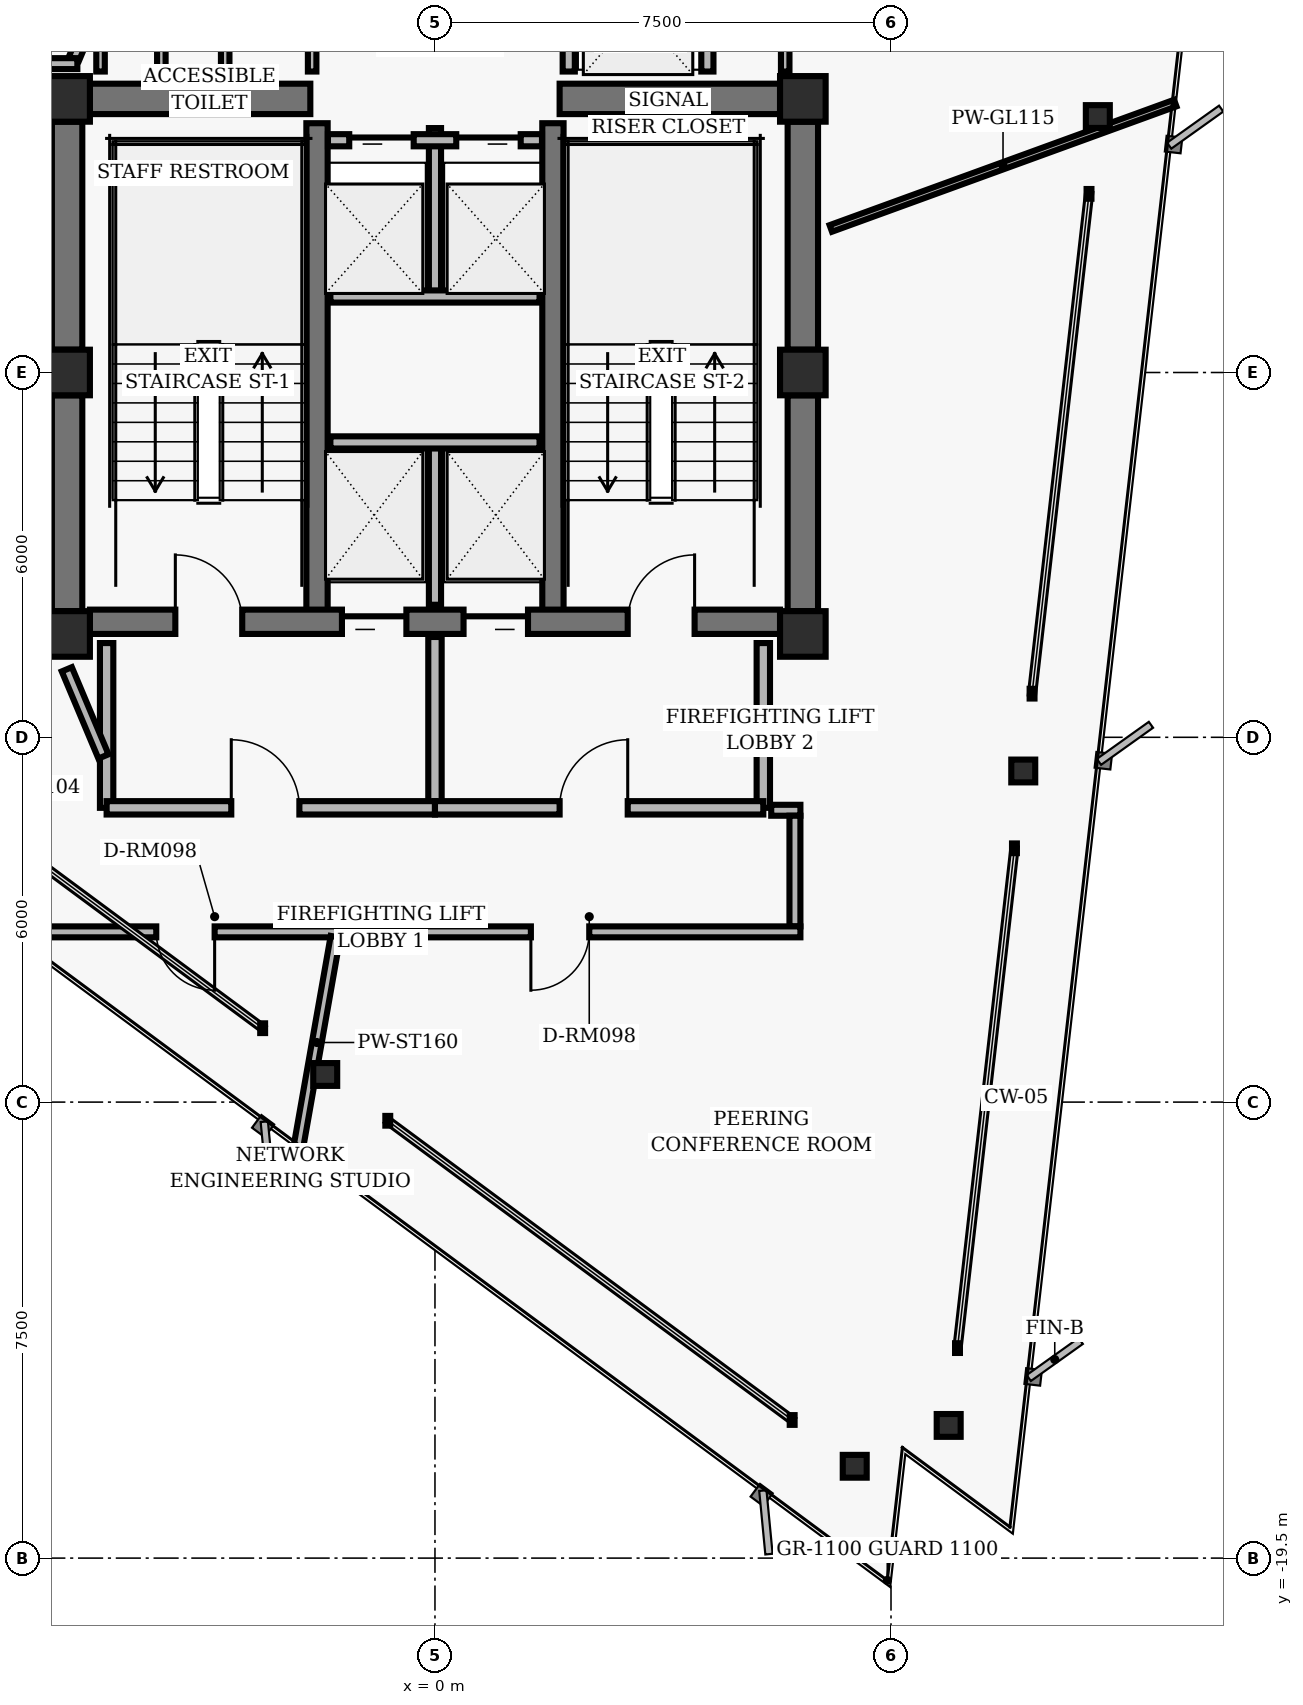
"""IFC4 building model, lengths in metres.
Left out: names, types, materials, properties, quantities, classifications, styles, units other than length and angle.
Written with IfcOpenShell. Run it as: python <this file> out.ifc"""

import sys

from ifc_helpers import new_model, si_unit, direction, frame, frame_2d, origin, origin_2d, place, context, subcontext, project, spatial, rectangle, hollow_rectangle, i_section, extrude, element, fill, save


model = new_model("IFC4")
c1 = context("Model", 3, precision=1e-05, world=origin(), true_north=direction((0.0, 1.0)))
c2 = subcontext(c1, "Body", "Model", "MODEL_VIEW")
j1 = project(units=[si_unit("LENGTHUNIT", "METRE"), si_unit("PLANEANGLEUNIT", "RADIAN")], contexts=[c1])
p1 = place(None, origin())
s1 = spatial("IfcSite", under=j1, at=p1, CompositionType="ELEMENT")
p2 = place(p1, origin())
s2 = spatial("IfcBuilding", under=s1, at=p2, CompositionType="ELEMENT")
p3 = place(p2, frame((0.0, 0.0, 220.96)))
s3 = spatial("IfcBuildingStorey", under=s2, at=p3, CompositionType="ELEMENT", Elevation=220.96)
for number, where, z_axis, x_axis in (
    (1, (-6.05, 4.5, 0.0), (0.0, 0.0, 1.0), (1.0, 0.0, 0.0)),
    (2, (6.05, 4.5, 0.0), (0.0, 0.0, 1.0), (1.0, 0.0, 0.0)),
    (3, (-6.05, 0.0, 0.0), (0.0, 0.0, 1.0), (1.0, 0.0, 0.0)),
    (4, (6.05, 0.0, 0.0), (0.0, 0.0, 1.0), (1.0, 0.0, 0.0)),
    (5, (-6.05, -4.3, 0.0), (0.0, 0.0, 1.0), (1.0, 0.0, 0.0)),
    (6, (6.05, -4.3, 0.0), (0.0, 0.0, 1.0), (1.0, 0.0, 0.0)),
):
    element("IfcColumn", number, at=place(p3, frame(where, z_axis=z_axis, x_axis=x_axis)), inside=s3, PredefinedType="COLUMN", context=c2, shape_type="SweptSolid", body=[
        extrude(hollow_rectangle(XDim=0.75, YDim=0.75, WallThickness=0.05, InnerFilletRadius=0.02, OuterFilletRadius=0.04, at=origin_2d()), origin(), (0.0, 0.0, 1.0), 3.04),
    ])
p4 = place(p3, frame((-6.05, 0.375, 0.0), z_axis=(0.0, 0.0, 1.0), x_axis=(0.0, 1.0, 0.0)))
e7 = element("IfcWall", 7, at=p4, inside=s3, PredefinedType="SHEAR", context=c2, shape_type="SweptSolid", body=[
    extrude(rectangle(XDim=3.75, YDim=0.5, at=frame_2d((1.875, 0.0))), origin(), (0.0, 0.0, 1.0), 2.798),
])
p5 = place(p3, frame((-6.05, -3.925, 0.0), z_axis=(0.0, 0.0, 1.0), x_axis=(0.0, 1.0, 0.0)))
e8 = element("IfcWall", 8, at=p5, inside=s3, PredefinedType="SHEAR", context=c2, shape_type="SweptSolid", body=[
    extrude(rectangle(XDim=3.55, YDim=0.5, at=frame_2d((1.775, 0.0))), origin(), (0.0, 0.0, 1.0), 2.798),
])
p6 = place(p3, frame((6.05, 0.375, 0.0), z_axis=(0.0, 0.0, 1.0), x_axis=(0.0, 1.0, 0.0)))
e9 = element("IfcWall", 9, at=p6, inside=s3, PredefinedType="SHEAR", context=c2, shape_type="SweptSolid", body=[
    extrude(rectangle(XDim=3.75, YDim=0.5, at=frame_2d((1.875, 0.0))), origin(), (0.0, 0.0, 1.0), 2.798),
])
p7 = place(p3, frame((6.05, -3.925, 0.0), z_axis=(0.0, 0.0, 1.0), x_axis=(0.0, 1.0, 0.0)))
e10 = element("IfcWall", 10, at=p7, inside=s3, PredefinedType="SHEAR", context=c2, shape_type="SweptSolid", body=[
    extrude(rectangle(XDim=3.55, YDim=0.5, at=frame_2d((1.775, 0.0))), origin(), (0.0, 0.0, 1.0), 2.798),
])
for number, where, z_axis, x_axis in (
    (11, (-1.94, -4.1, 0.0), (0.0, 0.0, 1.0), (0.0, 1.0, 0.0)),
    (12, (1.94, -4.1, 0.0), (0.0, 0.0, 1.0), (0.0, 1.0, 0.0)),
):
    element("IfcWall", number, at=place(p3, frame(where, z_axis=z_axis, x_axis=x_axis)), inside=s3, PredefinedType="SHEAR", context=c2, shape_type="SweptSolid", body=[
        extrude(rectangle(XDim=8.2, YDim=0.35, at=frame_2d((4.1, 0.0))), origin(), (0.0, 0.0, 1.0), 2.798),
    ])
p8 = place(p3, frame((-5.675, -4.1, 0.0), z_axis=(0.0, 0.0, 1.0), x_axis=(1.0, 0.0, 0.0)))
e13 = element("IfcWall", 13, at=p8, inside=s3, PredefinedType="SHEAR", context=c2, shape_type="SweptSolid", body=[
    extrude(rectangle(XDim=11.35, YDim=0.4, at=frame_2d((5.675, 0.0))), origin(), (0.0, 0.0, 1.0), 2.798),
])
p9 = place(p8, frame((1.405, 0.0, 0.0)))
e14 = element("IfcOpeningElement", 14, at=p9, cuts=e13, PredefinedType="OPENING", context=c2, shape_type="SweptSolid", body=[
    extrude(rectangle(XDim=1.1, YDim=2.04, at=frame_2d((0.55, 1.02))), frame((0.0, 0.21, 0.0), z_axis=(0.0, -1.0, 0.0), x_axis=(1.0, 0.0, 0.0)), (0.0, 0.0, 1.0), 0.42),
])
p10 = place(p8, frame((8.845, 0.0, 0.0)))
e15 = element("IfcOpeningElement", 15, at=p10, cuts=e13, PredefinedType="OPENING", context=c2, shape_type="SweptSolid", body=[
    extrude(rectangle(XDim=1.1, YDim=2.04, at=frame_2d((0.55, 1.02))), frame((0.0, 0.21, 0.0), z_axis=(0.0, -1.0, 0.0), x_axis=(1.0, 0.0, 0.0)), (0.0, 0.0, 1.0), 0.42),
])
p11 = place(p8, frame((4.145, 0.0, 0.0)))
e16 = element("IfcOpeningElement", 16, at=p11, cuts=e13, PredefinedType="OPENING", context=c2, shape_type="SweptSolid", body=[
    extrude(rectangle(XDim=1.06, YDim=2.04, at=frame_2d((0.53, 1.02))), frame((0.0, 0.21, 0.0), z_axis=(0.0, -1.0, 0.0), x_axis=(1.0, 0.0, 0.0)), (0.0, 0.0, 1.0), 0.42),
])
p12 = place(p8, frame((6.145, 0.0, 0.0)))
e17 = element("IfcOpeningElement", 17, at=p12, cuts=e13, PredefinedType="OPENING", context=c2, shape_type="SweptSolid", body=[
    extrude(rectangle(XDim=1.06, YDim=2.04, at=frame_2d((0.53, 1.02))), frame((0.0, 0.21, 0.0), z_axis=(0.0, -1.0, 0.0), x_axis=(1.0, 0.0, 0.0)), (0.0, 0.0, 1.0), 0.42),
])
for number, where, z_axis, x_axis in (
    (18, (-5.675, 4.5, 0.0), (0.0, 0.0, 1.0), (1.0, 0.0, 0.0)),
    (19, (2.05, 4.5, 0.0), (0.0, 0.0, 1.0), (1.0, 0.0, 0.0)),
):
    element("IfcWall", number, at=place(p3, frame(where, z_axis=z_axis, x_axis=x_axis)), inside=s3, PredefinedType="SHEAR", context=c2, shape_type="SweptSolid", body=[
        extrude(rectangle(XDim=3.625, YDim=0.5, at=frame_2d((1.812, 0.0))), origin(), (0.0, 0.0, 1.0), 2.798),
    ])
for number, where, z_axis, x_axis in (
    (20, (8.448, -17.318, 0.0), (0.0, 0.0, 1.0), (1.0, 0.0, 0.0)),
    (21, (9.675, -6.554, 0.0), (0.0, 0.0, 1.0), (1.0, 0.0, 0.0)),
    (22, (10.901, 4.21, 0.0), (0.0, 0.0, 1.0), (1.0, 0.0, 0.0)),
    (23, (-1.805, -11.546, 0.0), (0.0, 0.0, 1.0), (1.0, 0.0, 0.0)),
    (24, (6.903, -17.99, 0.0), (0.0, 0.0, 1.0), (1.0, 0.0, 0.0)),
):
    element("IfcColumn", number, at=place(p3, frame(where, z_axis=z_axis, x_axis=x_axis)), inside=s3, PredefinedType="COLUMN", context=c2, shape_type="SweptSolid", body=[
        extrude(i_section(OverallWidth=0.394, OverallDepth=0.375, WebThickness=0.017, FlangeThickness=0.028, FilletRadius=0.016, at=origin_2d()), origin(), (0.0, 0.0, 1.0), 3.04),
    ])
p13 = place(p3, frame((0.0, -3.82, 0.0), z_axis=(0.0, 0.0, 1.0), x_axis=(0.0, 1.0, 0.0)))
e25 = element("IfcWall", 25, at=p13, inside=s3, PredefinedType="PARTITIONING", context=c2, shape_type="SweptSolid", body=[
    extrude(rectangle(XDim=2.67, YDim=0.2, at=frame_2d((1.335, 0.0))), origin(), (0.0, 0.0, 1.0), 2.773),
])
p14 = place(p3, frame((-1.72, -1.15, 0.0), z_axis=(0.0, 0.0, 1.0), x_axis=(1.0, 0.0, 0.0)))
e26 = element("IfcWall", 26, at=p14, inside=s3, PredefinedType="PARTITIONING", context=c2, shape_type="SweptSolid", body=[
    extrude(rectangle(XDim=3.44, YDim=0.2, at=frame_2d((1.72, 0.0))), origin(), (0.0, 0.0, 1.0), 2.773),
])
for number, where, z_axis, x_axis in (
    (27, (-5.4, -7.16, 0.0), (0.0, 0.0, 1.0), (0.0, 1.0, 0.0)),
    (28, (5.4, -7.16, 0.0), (0.0, 0.0, 1.0), (0.0, 1.0, 0.0)),
):
    element("IfcWall", number, at=place(p3, frame(where, z_axis=z_axis, x_axis=x_axis)), inside=s3, PredefinedType="PARTITIONING", context=c2, shape_type="SweptSolid", body=[
        extrude(rectangle(XDim=2.71, YDim=0.22, at=frame_2d((1.355, 0.0))), origin(), (0.0, 0.0, 1.0), 2.773),
    ])
p15 = place(p3, frame((0.0, -7.16, 0.0), z_axis=(0.0, 0.0, 1.0), x_axis=(0.0, 1.0, 0.0)))
e29 = element("IfcWall", 29, at=p15, inside=s3, PredefinedType="PARTITIONING", context=c2, shape_type="SweptSolid", body=[
    extrude(rectangle(XDim=2.81, YDim=0.22, at=frame_2d((1.405, 0.0))), origin(), (0.0, 0.0, 1.0), 2.773),
])
p16 = place(p3, frame((-5.4, -7.16, 0.0), z_axis=(0.0, 0.0, 1.0), x_axis=(1.0, 0.0, 0.0)))
e30 = element("IfcWall", 30, at=p16, inside=s3, PredefinedType="PARTITIONING", context=c2, shape_type="SweptSolid", body=[
    extrude(rectangle(XDim=5.4, YDim=0.22, at=frame_2d((2.7, 0.0))), origin(), (0.0, 0.0, 1.0), 2.395),
])
p17 = place(p16, frame((2.05, 0.0, 0.0)))
e31 = element("IfcOpeningElement", 31, at=p17, cuts=e30, PredefinedType="OPENING", context=c2, shape_type="SweptSolid", body=[
    extrude(rectangle(XDim=1.12, YDim=2.02, at=frame_2d((0.56, 1.01))), frame((0.0, 0.12, 0.0), z_axis=(0.0, -1.0, 0.0), x_axis=(1.0, 0.0, 0.0)), (0.0, 0.0, 1.0), 0.24),
])
p18 = place(p3, frame((0.0, -7.16, 0.0), z_axis=(0.0, 0.0, 1.0), x_axis=(1.0, 0.0, 0.0)))
e32 = element("IfcWall", 32, at=p18, inside=s3, PredefinedType="PARTITIONING", context=c2, shape_type="SweptSolid", body=[
    extrude(rectangle(XDim=5.4, YDim=0.22, at=frame_2d((2.7, 0.0))), origin(), (0.0, 0.0, 1.0), 2.773),
])
p19 = place(p18, frame((2.05, 0.0, 0.0)))
e33 = element("IfcOpeningElement", 33, at=p19, cuts=e32, PredefinedType="OPENING", context=c2, shape_type="SweptSolid", body=[
    extrude(rectangle(XDim=1.12, YDim=2.02, at=frame_2d((0.56, 1.01))), frame((0.0, 0.12, 0.0), z_axis=(0.0, -1.0, 0.0), x_axis=(1.0, 0.0, 0.0)), (0.0, 0.0, 1.0), 0.24),
])
p20 = place(p3, frame((0.0, 1.25, 0.0), z_axis=(0.0, 0.0, 1.0), x_axis=(0.0, 1.0, 0.0)))
e34 = element("IfcWall", 34, at=p20, inside=s3, PredefinedType="PARTITIONING", context=c2, shape_type="SweptSolid", body=[
    extrude(rectangle(XDim=2.77, YDim=0.2, at=frame_2d((1.385, 0.0))), origin(), (0.0, 0.0, 1.0), 2.773),
])
p21 = place(p3, frame((-1.72, 1.25, 0.0), z_axis=(0.0, 0.0, 1.0), x_axis=(1.0, 0.0, 0.0)))
e35 = element("IfcWall", 35, at=p21, inside=s3, PredefinedType="PARTITIONING", context=c2, shape_type="SweptSolid", body=[
    extrude(rectangle(XDim=3.44, YDim=0.2, at=frame_2d((1.72, 0.0))), origin(), (0.0, 0.0, 1.0), 2.773),
])
p22 = place(p3, frame((-1.76, 3.82, 0.0), z_axis=(0.0, 0.0, 1.0), x_axis=(1.0, 0.0, 0.0)))
e36 = element("IfcWall", 36, at=p22, inside=s3, PredefinedType="PARTITIONING", context=c2, shape_type="SweptSolid", body=[
    extrude(rectangle(XDim=3.52, YDim=0.2, at=frame_2d((1.76, 0.0))), origin(), (0.0, 0.0, 1.0), 2.773),
])
p23 = place(p22, frame((0.35, 0.0, 0.0)))
e37 = element("IfcOpeningElement", 37, at=p23, cuts=e36, PredefinedType="OPENING", context=c2, shape_type="SweptSolid", body=[
    extrude(rectangle(XDim=1.06, YDim=2.04, at=frame_2d((0.53, 1.02))), frame((0.0, 0.11, 0.0), z_axis=(0.0, -1.0, 0.0), x_axis=(1.0, 0.0, 0.0)), (0.0, 0.0, 1.0), 0.22),
])
p24 = place(p22, frame((2.11, 0.0, 0.0)))
e38 = element("IfcOpeningElement", 38, at=p24, cuts=e36, PredefinedType="OPENING", context=c2, shape_type="SweptSolid", body=[
    extrude(rectangle(XDim=1.06, YDim=2.04, at=frame_2d((0.53, 1.02))), frame((0.0, 0.11, 0.0), z_axis=(0.0, -1.0, 0.0), x_axis=(1.0, 0.0, 0.0)), (0.0, 0.0, 1.0), 0.22),
])
for number, where, z_axis, x_axis in (
    (39, (2.2, 4.95, 0.0), (0.0, 0.0, 1.0), (0.0, 1.0, 0.0)),
    (40, (4.48, 4.95, 0.0), (0.0, 0.0, 1.0), (0.0, 1.0, 0.0)),
):
    element("IfcWall", number, at=place(p3, frame(where, z_axis=z_axis, x_axis=x_axis)), inside=s3, PredefinedType="PARTITIONING", context=c2, shape_type="SweptSolid", body=[
        extrude(rectangle(XDim=2.1, YDim=0.2, at=frame_2d((1.05, 0.0))), origin(), (0.0, 0.0, 1.0), 2.773),
    ])
for number, where, z_axis, x_axis in (
    (41, (-5.5, 4.95, 0.0), (0.0, 0.0, 1.0), (0.0, 1.0, 0.0)),
    (42, (-4.5, 4.95, 0.0), (0.0, 0.0, 1.0), (0.0, 1.0, 0.0)),
    (43, (-3.45, 4.95, 0.0), (0.0, 0.0, 1.0), (0.0, 1.0, 0.0)),
    (44, (-2.02, 4.95, 0.0), (0.0, 0.0, 1.0), (0.0, 1.0, 0.0)),
    (45, (5.76, 4.95, 0.0), (0.0, 0.0, 1.0), (0.0, 1.0, 0.0)),
):
    element("IfcWall", number, at=place(p3, frame(where, z_axis=z_axis, x_axis=x_axis)), inside=s3, PredefinedType="PARTITIONING", context=c2, shape_type="SweptSolid", body=[
        extrude(rectangle(XDim=2.1, YDim=0.14, at=frame_2d((1.05, 0.0))), origin(), (0.0, 0.0, 1.0), 2.773),
    ])
p25 = place(p3, frame((-5.632, 5.887, 0.0), z_axis=(0.0, 0.0, 1.0), x_axis=(-0.387792833522, -0.921746558588, 0.0)))
e46 = element("IfcWall", 46, at=p25, inside=s3, PredefinedType="PARTITIONING", context=c2, shape_type="SweptSolid", body=[
    extrude(rectangle(XDim=0.785, YDim=0.18, at=frame_2d((0.393, 0.0))), origin(), (0.0, 0.0, 1.0), 2.773),
])
p26 = place(p3, frame((-5.881, 5.08, 0.0), z_axis=(0.0, 0.0, 1.0), x_axis=(-1.0, 0.0, 0.0)))
e47 = element("IfcWall", 47, at=p26, inside=s3, PredefinedType="PARTITIONING", context=c2, shape_type="SweptSolid", body=[
    extrude(rectangle(XDim=0.589, YDim=0.18, at=frame_2d((0.294, 0.0))), origin(), (0.0, 0.0, 1.0), 2.773),
])
p27 = place(p3, frame((-6.055, -4.882, 0.0), z_axis=(0.0, 0.0, 1.0), x_axis=(0.387579540458, -0.921836265189, 0.0)))
e48 = element("IfcWall", 48, at=p27, inside=s3, PredefinedType="PARTITIONING", context=c2, shape_type="SweptSolid", body=[
    extrude(rectangle(XDim=1.555, YDim=0.18, at=frame_2d((0.777, 0.0))), origin(), (0.0, 0.0, 1.0), 2.253),
])
p28 = place(p3, frame((5.53, -7.2, 0.0), z_axis=(0.0, 0.0, 1.0), x_axis=(1.0, 0.0, 0.0)))
e49 = element("IfcWall", 49, at=p28, inside=s3, PredefinedType="PARTITIONING", context=c2, shape_type="SweptSolid", body=[
    extrude(rectangle(XDim=0.48, YDim=0.18, at=frame_2d((0.24, 0.0))), origin(), (0.0, 0.0, 1.0), 2.773),
])
p29 = place(p3, frame((5.92, -7.29, 0.0), z_axis=(0.0, 0.0, 1.0), x_axis=(0.0, -1.0, 0.0)))
e50 = element("IfcWall", 50, at=p29, inside=s3, PredefinedType="PARTITIONING", context=c2, shape_type="SweptSolid", body=[
    extrude(rectangle(XDim=1.82, YDim=0.18, at=frame_2d((0.91, 0.0))), origin(), (0.0, 0.0, 1.0), 2.253),
])
p30 = place(p3, frame((6.01, -9.2, 0.0), z_axis=(0.0, 0.0, 1.0), x_axis=(-1.0, 0.0, 0.0)))
e51 = element("IfcWall", 51, at=p30, inside=s3, PredefinedType="PARTITIONING", context=c2, shape_type="SweptSolid", body=[
    extrude(rectangle(XDim=12.84, YDim=0.18, at=frame_2d((6.42, 0.0))), origin(), (0.0, 0.0, 1.0), 2.773),
])
p31 = place(p30, frame((9.634, 0.0, 0.0)))
e52 = element("IfcOpeningElement", 52, at=p31, cuts=e51, PredefinedType="OPENING", context=c2, shape_type="SweptSolid", body=[
    extrude(rectangle(XDim=0.96, YDim=2.02, at=frame_2d((0.48, 1.01))), frame((0.0, 0.1, 0.0), z_axis=(0.0, -1.0, 0.0), x_axis=(1.0, 0.0, 0.0)), (0.0, 0.0, 1.0), 0.2),
])
p32 = place(p30, frame((3.473, 0.0, 0.0)))
e53 = element("IfcOpeningElement", 53, at=p32, cuts=e51, PredefinedType="OPENING", context=c2, shape_type="SweptSolid", body=[
    extrude(rectangle(XDim=0.96, YDim=2.02, at=frame_2d((0.48, 1.01))), frame((0.0, 0.1, 0.0), z_axis=(0.0, -1.0, 0.0), x_axis=(1.0, 0.0, 0.0)), (0.0, 0.0, 1.0), 0.2),
])
p33 = place(p3, frame((-1.636, -9.28, 0.0), z_axis=(0.0, 0.0, 1.0), x_axis=(-0.17367100135, -0.984803728308, 0.0)))
e54 = element("IfcWall", 54, at=p33, inside=s3, PredefinedType="PARTITIONING", context=c2, shape_type="SweptSolid", body=[
    extrude(rectangle(XDim=3.533, YDim=0.16, at=frame_2d((1.766, 0.0))), origin(), (0.0, 0.0, 1.0), 2.773),
])
p34 = place(p3, frame((6.51, 2.369, 0.0), z_axis=(0.0, 0.0, 1.0), x_axis=(0.939690503952, 0.342025959222, 0.0)))
e55 = element("IfcWall", 55, at=p34, inside=s3, PredefinedType="MOVABLE", context=c2, shape_type="SweptSolid", body=[
    extrude(rectangle(XDim=6.028, YDim=0.115, at=frame_2d((3.014, 0.0))), origin(), (0.0, 0.0, 1.0), 2.773),
])
p35 = place(p9, origin())
e56 = element("IfcDoor", 56, at=p35, inside=s3, OperationType="SINGLE_SWING_LEFT", PredefinedType="DOOR", context=c2, shape_type="SweptSolid", body=[
    extrude(rectangle(XDim=1.1, YDim=2.04, at=frame_2d((0.55, 1.02))), frame((0.0, 0.025, 0.0), z_axis=(0.0, -1.0, 0.0), x_axis=(1.0, 0.0, 0.0)), (0.0, 0.0, 1.0), 0.05),
])
fill(e14, e56)
p36 = place(p10, origin())
e57 = element("IfcDoor", 57, at=p36, inside=s3, OperationType="SINGLE_SWING_RIGHT", PredefinedType="DOOR", context=c2, shape_type="SweptSolid", body=[
    extrude(rectangle(XDim=1.1, YDim=2.04, at=frame_2d((0.55, 1.02))), frame((0.0, 0.025, 0.0), z_axis=(0.0, -1.0, 0.0), x_axis=(1.0, 0.0, 0.0)), (0.0, 0.0, 1.0), 0.05),
])
fill(e15, e57)
p37 = place(p11, origin())
e58 = element("IfcDoor", 58, at=p37, inside=s3, OperationType="SLIDING_TO_LEFT", PredefinedType="DOOR", context=c2, shape_type="SweptSolid", body=[
    extrude(rectangle(XDim=1.06, YDim=2.04, at=frame_2d((0.53, 1.02))), frame((0.0, 0.025, 0.0), z_axis=(0.0, -1.0, 0.0), x_axis=(1.0, 0.0, 0.0)), (0.0, 0.0, 1.0), 0.05),
])
fill(e16, e58)
p38 = place(p12, origin())
e59 = element("IfcDoor", 59, at=p38, inside=s3, OperationType="SLIDING_TO_RIGHT", PredefinedType="DOOR", context=c2, shape_type="SweptSolid", body=[
    extrude(rectangle(XDim=1.06, YDim=2.04, at=frame_2d((0.53, 1.02))), frame((0.0, 0.025, 0.0), z_axis=(0.0, -1.0, 0.0), x_axis=(1.0, 0.0, 0.0)), (0.0, 0.0, 1.0), 0.05),
])
fill(e17, e59)
p39 = place(p17, origin())
e60 = element("IfcDoor", 60, at=p39, inside=s3, OperationType="SINGLE_SWING_LEFT", PredefinedType="DOOR", context=c2, shape_type="SweptSolid", body=[
    extrude(rectangle(XDim=1.12, YDim=2.02, at=frame_2d((0.56, 1.01))), frame((0.0, 0.025, 0.0), z_axis=(0.0, -1.0, 0.0), x_axis=(1.0, 0.0, 0.0)), (0.0, 0.0, 1.0), 0.05),
])
fill(e31, e60)
p40 = place(p19, origin())
e61 = element("IfcDoor", 61, at=p40, inside=s3, OperationType="SINGLE_SWING_RIGHT", PredefinedType="DOOR", context=c2, shape_type="SweptSolid", body=[
    extrude(rectangle(XDim=1.12, YDim=2.02, at=frame_2d((0.56, 1.01))), frame((0.0, 0.025, 0.0), z_axis=(0.0, -1.0, 0.0), x_axis=(1.0, 0.0, 0.0)), (0.0, 0.0, 1.0), 0.05),
])
fill(e33, e61)
p41 = place(p23, origin())
e62 = element("IfcDoor", 62, at=p41, inside=s3, OperationType="SLIDING_TO_LEFT", PredefinedType="DOOR", context=c2, shape_type="SweptSolid", body=[
    extrude(rectangle(XDim=1.06, YDim=2.04, at=frame_2d((0.53, 1.02))), frame((0.0, 0.025, 0.0), z_axis=(0.0, -1.0, 0.0), x_axis=(1.0, 0.0, 0.0)), (0.0, 0.0, 1.0), 0.05),
])
fill(e37, e62)
p42 = place(p24, origin())
e63 = element("IfcDoor", 63, at=p42, inside=s3, OperationType="SLIDING_TO_RIGHT", PredefinedType="DOOR", context=c2, shape_type="SweptSolid", body=[
    extrude(rectangle(XDim=1.06, YDim=2.04, at=frame_2d((0.53, 1.02))), frame((0.0, 0.025, 0.0), z_axis=(0.0, -1.0, 0.0), x_axis=(1.0, 0.0, 0.0)), (0.0, 0.0, 1.0), 0.05),
])
fill(e38, e63)
p43 = place(p31, origin())
e64 = element("IfcDoor", 64, at=p43, inside=s3, OperationType="SINGLE_SWING_LEFT", PredefinedType="DOOR", context=c2, shape_type="SweptSolid", body=[
    extrude(rectangle(XDim=0.96, YDim=2.02, at=frame_2d((0.48, 1.01))), frame((0.0, 0.025, 0.0), z_axis=(0.0, -1.0, 0.0), x_axis=(1.0, 0.0, 0.0)), (0.0, 0.0, 1.0), 0.05),
])
fill(e52, e64)
p44 = place(p32, origin())
e65 = element("IfcDoor", 65, at=p44, inside=s3, OperationType="SINGLE_SWING_RIGHT", PredefinedType="DOOR", context=c2, shape_type="SweptSolid", body=[
    extrude(rectangle(XDim=0.96, YDim=2.02, at=frame_2d((0.48, 1.01))), frame((0.0, 0.025, 0.0), z_axis=(0.0, -1.0, 0.0), x_axis=(1.0, 0.0, 0.0)), (0.0, 0.0, 1.0), 0.05),
])
fill(e53, e65)
save(model, sys.argv[1])
